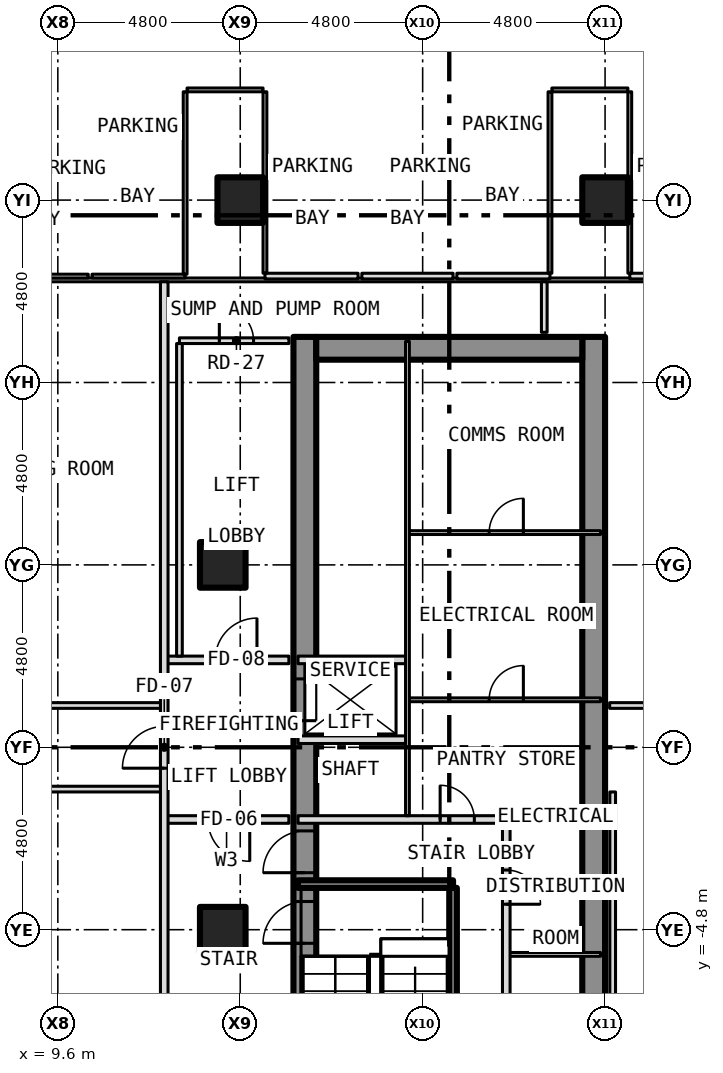
"""IFC4 building model, lengths in metres.
Left out: names, types, materials, properties, quantities, classifications, styles, units other than length and angle.
Written with IfcOpenShell. Run it as: python <this file> out.ifc"""

import sys

from ifc_helpers import new_model, si_unit, direction, frame, frame_2d, origin, origin_2d, place, context, subcontext, project, spatial, rectangle, hollow_rectangle, extrude, element, fill, save


model = new_model("IFC4")
c1 = context("Model", 3, precision=1e-05, world=origin(), true_north=direction((0.0, 1.0)))
c2 = subcontext(c1, "Body", "Model", "MODEL_VIEW")
j1 = project(units=[si_unit("LENGTHUNIT", "METRE"), si_unit("PLANEANGLEUNIT", "RADIAN")], contexts=[c1])
p1 = place(None, origin())
s1 = spatial("IfcSite", under=j1, at=p1, CompositionType="ELEMENT")
p2 = place(p1, origin())
s2 = spatial("IfcBuilding", under=s1, at=p2, CompositionType="ELEMENT")
p3 = place(p2, frame((0.0, 0.0, -10.0)))
s3 = spatial("IfcBuildingStorey", under=s2, at=p3, CompositionType="ELEMENT", Elevation=-10.0)
for number, where, z_axis, x_axis in (
    (1, (13.94, -4.8, -0.6), (0.0, 0.0, 1.0), (1.0, 0.0, 0.0)),
    (2, (13.94, 4.8, -0.6), (0.0, 0.0, 1.0), (1.0, 0.0, 0.0)),
    (3, (14.4, 14.4, -0.6), (0.0, 0.0, 1.0), (1.0, 0.0, 0.0)),
    (4, (24.0, 14.4, -0.6), (0.0, 0.0, 1.0), (1.0, 0.0, 0.0)),
):
    element("IfcColumn", number, at=place(p3, frame(where, z_axis=z_axis, x_axis=x_axis)), inside=s3, PredefinedType="COLUMN", context=c2, shape_type="SweptSolid", body=[
        extrude(hollow_rectangle(XDim=1.2, YDim=1.2, WallThickness=0.07, at=origin_2d()), origin(), (0.0, 0.0, 1.0), 5.3),
    ])
p4 = place(p3, frame((16.1, -10.8, 0.0), z_axis=(0.0, 0.0, 1.0), x_axis=(0.0, 1.0, 0.0)))
e5 = element("IfcWall", 5, at=p4, inside=s3, PredefinedType="SHEAR", context=c2, shape_type="SweptSolid", body=[
    extrude(rectangle(XDim=21.6, YDim=0.6, at=frame_2d((10.8, 0.0))), origin(), (0.0, 0.0, 1.0), 4.7),
])
p5 = place(p4, frame((11.5, 0.0, 0.0)))
e6 = element("IfcOpeningElement", 6, at=p5, cuts=e5, PredefinedType="OPENING", context=c2, shape_type="SweptSolid", body=[
    extrude(rectangle(XDim=1.1, YDim=2.1, at=frame_2d((0.55, 1.05))), frame((0.0, 0.312, 0.0), z_axis=(0.0, -1.0, 0.0), x_axis=(1.0, 0.0, 0.0)), (0.0, 0.0, 1.0), 0.624),
])
p6 = place(p4, frame((5.642, 0.0, 0.0)))
e7 = element("IfcOpeningElement", 7, at=p6, cuts=e5, PredefinedType="OPENING", context=c2, shape_type="SweptSolid", body=[
    extrude(rectangle(XDim=1.1, YDim=2.1, at=frame_2d((0.55, 1.05))), frame((0.0, 0.312, 0.0), z_axis=(0.0, -1.0, 0.0), x_axis=(1.0, 0.0, 0.0)), (0.0, 0.0, 1.0), 0.624),
])
p7 = place(p4, frame((7.5, 0.0, 0.0)))
e8 = element("IfcOpeningElement", 8, at=p7, cuts=e5, PredefinedType="OPENING", context=c2, shape_type="SweptSolid", body=[
    extrude(rectangle(XDim=1.1, YDim=2.1, at=frame_2d((0.55, 1.05))), frame((0.0, 0.312, 0.0), z_axis=(0.0, -1.0, 0.0), x_axis=(1.0, 0.0, 0.0)), (0.0, 0.0, 1.0), 0.624),
])
p8 = place(p3, frame((23.7, -10.8, 0.0), z_axis=(0.0, 0.0, 1.0), x_axis=(0.0, 1.0, 0.0)))
e9 = element("IfcWall", 9, at=p8, inside=s3, PredefinedType="SHEAR", context=c2, shape_type="SweptSolid", body=[
    extrude(rectangle(XDim=21.6, YDim=0.6, at=frame_2d((10.8, 0.0))), origin(), (0.0, 0.0, 1.0), 4.7),
])
p9 = place(p3, frame((16.4, 10.5, 0.0), z_axis=(0.0, 0.0, 1.0), x_axis=(1.0, 0.0, 0.0)))
e10 = element("IfcWall", 10, at=p9, inside=s3, PredefinedType="SHEAR", context=c2, shape_type="SweptSolid", body=[
    extrude(rectangle(XDim=7.0, YDim=0.6, at=frame_2d((3.5, 0.0))), origin(), (0.0, 0.0, 1.0), 4.7),
])
p10 = place(p3, frame((21.4, -5.45, 0.0), z_axis=(0.0, 0.0, 1.0), x_axis=(1.0, 0.0, 0.0)))
e11 = element("IfcWall", 11, at=p10, inside=s3, PredefinedType="PARTITIONING", context=c2, shape_type="SweptSolid", body=[
    extrude(rectangle(XDim=2.48, YDim=0.1, at=frame_2d((1.24, 0.0))), origin(), (0.0, 0.0, 1.0), 4.7),
])
p11 = place(p3, frame((15.92, -3.6, 0.0), z_axis=(0.0, 0.0, 1.0), x_axis=(1.0, 0.0, 0.0)))
e12 = element("IfcWall", 12, at=p11, inside=s3, PredefinedType="SHEAR", context=c2, shape_type="SweptSolid", body=[
    extrude(rectangle(XDim=4.08, YDim=0.2, at=frame_2d((2.04, 0.0))), origin(), (0.0, 0.0, 1.0), 4.7),
])
p12 = place(p3, frame((12.4, -1.9, 0.0), z_axis=(0.0, 0.0, 1.0), x_axis=(1.0, 0.0, 0.0)))
e13 = element("IfcWall", 13, at=p12, inside=s3, PredefinedType="PARTITIONING", context=c2, shape_type="SweptSolid", body=[
    extrude(rectangle(XDim=3.28, YDim=0.2, at=frame_2d((1.64, 0.0))), origin(), (0.0, 0.0, 1.0), 4.7),
])
p13 = place(p12, frame((1.15, 0.0, 0.0)))
e14 = element("IfcOpeningElement", 14, at=p13, cuts=e13, PredefinedType="OPENING", context=c2, shape_type="SweptSolid", body=[
    extrude(rectangle(XDim=1.1, YDim=2.1, at=frame_2d((0.55, 1.05))), frame((0.0, 0.112, 0.0), z_axis=(0.0, -1.0, 0.0), x_axis=(1.0, 0.0, 0.0)), (0.0, 0.0, 1.0), 0.224),
])
p14 = place(p3, frame((15.92, -1.9, 0.0), z_axis=(0.0, 0.0, 1.0), x_axis=(1.0, 0.0, 0.0)))
e15 = element("IfcWall", 15, at=p14, inside=s3, PredefinedType="PARTITIONING", context=c2, shape_type="SweptSolid", body=[
    extrude(rectangle(XDim=7.96, YDim=0.2, at=frame_2d((3.98, 0.0))), origin(), (0.0, 0.0, 1.0), 4.7),
])
p15 = place(p14, frame((3.74, 0.0, 0.0)))
e16 = element("IfcOpeningElement", 16, at=p15, cuts=e15, PredefinedType="OPENING", context=c2, shape_type="SweptSolid", body=[
    extrude(rectangle(XDim=0.9, YDim=2.1, at=frame_2d((0.45, 1.05))), frame((0.0, 0.112, 0.0), z_axis=(0.0, -1.0, 0.0), x_axis=(1.0, 0.0, 0.0)), (0.0, 0.0, 1.0), 0.224),
])
p16 = place(p3, frame((-12.4, -1.1, 0.0), z_axis=(0.0, 0.0, 1.0), x_axis=(1.0, 0.0, 0.0)))
e17 = element("IfcWall", 17, at=p16, inside=s3, PredefinedType="PARTITIONING", context=c2, shape_type="SweptSolid", body=[
    extrude(rectangle(XDim=24.8, YDim=0.15, at=frame_2d((12.4, 0.0))), origin(), (0.0, 0.0, 1.0), 4.7),
])
p17 = place(p3, frame((15.92, 0.2, 0.0), z_axis=(0.0, 0.0, 1.0), x_axis=(1.0, 0.0, 0.0)))
e18 = element("IfcWall", 18, at=p17, inside=s3, PredefinedType="PARTITIONING", context=c2, shape_type="SweptSolid", body=[
    extrude(rectangle(XDim=2.88, YDim=0.2, at=frame_2d((1.44, 0.0))), origin(), (0.0, 0.0, 1.0), 4.7),
])
p18 = place(p3, frame((-12.4, 1.1, 0.0), z_axis=(0.0, 0.0, 1.0), x_axis=(1.0, 0.0, 0.0)))
e19 = element("IfcWall", 19, at=p18, inside=s3, PredefinedType="PARTITIONING", context=c2, shape_type="SweptSolid", body=[
    extrude(rectangle(XDim=24.8, YDim=0.15, at=frame_2d((12.4, 0.0))), origin(), (0.0, 0.0, 1.0), 4.7),
])
p19 = place(p18, frame((9.35, 0.0, 0.0)))
e20 = element("IfcOpeningElement", 20, at=p19, cuts=e19, PredefinedType="OPENING", context=c2, shape_type="SweptSolid", body=[
    extrude(rectangle(XDim=0.9, YDim=2.1, at=frame_2d((0.45, 1.05))), frame((0.0, 0.087, 0.0), z_axis=(0.0, -1.0, 0.0), x_axis=(1.0, 0.0, 0.0)), (0.0, 0.0, 1.0), 0.174),
])
p20 = place(p18, frame((19.35, 0.0, 0.0)))
e21 = element("IfcOpeningElement", 21, at=p20, cuts=e19, PredefinedType="OPENING", context=c2, shape_type="SweptSolid", body=[
    extrude(rectangle(XDim=0.9, YDim=2.1, at=frame_2d((0.45, 1.05))), frame((0.0, 0.087, 0.0), z_axis=(0.0, -1.0, 0.0), x_axis=(1.0, 0.0, 0.0)), (0.0, 0.0, 1.0), 0.174),
])
p21 = place(p3, frame((24.12, 1.1, 0.0), z_axis=(0.0, 0.0, 1.0), x_axis=(1.0, 0.0, 0.0)))
e22 = element("IfcWall", 22, at=p21, inside=s3, PredefinedType="PARTITIONING", context=c2, shape_type="SweptSolid", body=[
    extrude(rectangle(XDim=8.23, YDim=0.15, at=frame_2d((4.115, 0.0))), origin(), (0.0, 0.0, 1.0), 4.7),
])
p22 = place(p21, frame((3.63, 0.0, 0.0)))
e23 = element("IfcOpeningElement", 23, at=p22, cuts=e22, PredefinedType="OPENING", context=c2, shape_type="SweptSolid", body=[
    extrude(rectangle(XDim=0.9, YDim=2.1, at=frame_2d((0.45, 1.05))), frame((0.0, 0.087, 0.0), z_axis=(0.0, -1.0, 0.0), x_axis=(1.0, 0.0, 0.0)), (0.0, 0.0, 1.0), 0.174),
])
p23 = place(p3, frame((18.8, 1.25, 0.0), z_axis=(0.0, 0.0, 1.0), x_axis=(1.0, 0.0, 0.0)))
e24 = element("IfcWall", 24, at=p23, inside=s3, PredefinedType="PARTITIONING", context=c2, shape_type="SweptSolid", body=[
    extrude(rectangle(XDim=5.08, YDim=0.1, at=frame_2d((2.54, 0.0))), origin(), (0.0, 0.0, 1.0), 4.7),
])
p24 = place(p23, frame((2.15, 0.0, 0.0)))
e25 = element("IfcOpeningElement", 25, at=p24, cuts=e24, PredefinedType="OPENING", context=c2, shape_type="SweptSolid", body=[
    extrude(rectangle(XDim=0.9, YDim=2.1, at=frame_2d((0.45, 1.05))), frame((0.0, 0.062, 0.0), z_axis=(0.0, -1.0, 0.0), x_axis=(1.0, 0.0, 0.0)), (0.0, 0.0, 1.0), 0.124),
])
p25 = place(p3, frame((12.4, 2.3, 0.0), z_axis=(0.0, 0.0, 1.0), x_axis=(1.0, 0.0, 0.0)))
e26 = element("IfcWall", 26, at=p25, inside=s3, PredefinedType="PARTITIONING", context=c2, shape_type="SweptSolid", body=[
    extrude(rectangle(XDim=3.28, YDim=0.2, at=frame_2d((1.64, 0.0))), origin(), (0.0, 0.0, 1.0), 4.7),
])
p26 = place(p25, frame((1.34, 0.0, 0.0)))
e27 = element("IfcOpeningElement", 27, at=p26, cuts=e26, PredefinedType="OPENING", context=c2, shape_type="SweptSolid", body=[
    extrude(rectangle(XDim=1.1, YDim=2.1, at=frame_2d((0.55, 1.05))), frame((0.0, 0.112, 0.0), z_axis=(0.0, -1.0, 0.0), x_axis=(1.0, 0.0, 0.0)), (0.0, 0.0, 1.0), 0.224),
])
p27 = place(p3, frame((15.92, 2.3, 0.0), z_axis=(0.0, 0.0, 1.0), x_axis=(1.0, 0.0, 0.0)))
e28 = element("IfcWall", 28, at=p27, inside=s3, PredefinedType="PARTITIONING", context=c2, shape_type="SweptSolid", body=[
    extrude(rectangle(XDim=2.88, YDim=0.2, at=frame_2d((1.44, 0.0))), origin(), (0.0, 0.0, 1.0), 4.7),
])
p28 = place(p3, frame((18.8, 5.65, 0.0), z_axis=(0.0, 0.0, 1.0), x_axis=(1.0, 0.0, 0.0)))
e29 = element("IfcWall", 29, at=p28, inside=s3, PredefinedType="PARTITIONING", context=c2, shape_type="SweptSolid", body=[
    extrude(rectangle(XDim=5.08, YDim=0.1, at=frame_2d((2.54, 0.0))), origin(), (0.0, 0.0, 1.0), 4.7),
])
p29 = place(p28, frame((2.15, 0.0, 0.0)))
e30 = element("IfcOpeningElement", 30, at=p29, cuts=e29, PredefinedType="OPENING", context=c2, shape_type="SweptSolid", body=[
    extrude(rectangle(XDim=0.9, YDim=2.1, at=frame_2d((0.45, 1.05))), frame((0.0, 0.062, 0.0), z_axis=(0.0, -1.0, 0.0), x_axis=(1.0, 0.0, 0.0)), (0.0, 0.0, 1.0), 0.124),
])
p30 = place(p3, frame((12.8, 10.7, 0.0), z_axis=(0.0, 0.0, 1.0), x_axis=(1.0, 0.0, 0.0)))
e31 = element("IfcWall", 31, at=p30, inside=s3, PredefinedType="PARTITIONING", context=c2, shape_type="SweptSolid", body=[
    extrude(rectangle(XDim=2.88, YDim=0.15, at=frame_2d((1.44, 0.0))), origin(), (0.0, 0.0, 1.0), 4.7),
])
p31 = place(p30, frame((1.05, 0.0, 0.0)))
e32 = element("IfcOpeningElement", 32, at=p31, cuts=e31, PredefinedType="OPENING", context=c2, shape_type="SweptSolid", body=[
    extrude(rectangle(XDim=0.9, YDim=2.1, at=frame_2d((0.45, 1.05))), frame((0.0, 0.087, 0.0), z_axis=(0.0, -1.0, 0.0), x_axis=(1.0, 0.0, 0.0)), (0.0, 0.0, 1.0), 0.174),
])
p32 = place(p3, frame((-37.6, 12.3, 0.0), z_axis=(0.0, 0.0, 1.0), x_axis=(1.0, 0.0, 0.0)))
e33 = element("IfcWall", 33, at=p32, inside=s3, PredefinedType="PARTITIONING", context=c2, shape_type="SweptSolid", body=[
    extrude(rectangle(XDim=70.0, YDim=0.1, at=frame_2d((35.0, 0.0))), origin(), (0.0, 0.0, 1.0), 4.7),
])
p33 = place(p3, frame((8.0, 12.4, 0.0), z_axis=(0.0, 0.0, 1.0), x_axis=(1.0, 0.0, 0.0)))
e34 = element("IfcWall", 34, at=p33, inside=s3, PredefinedType="PARTITIONING", context=c2, shape_type="SweptSolid", body=[
    extrude(rectangle(XDim=2.4, YDim=0.1, at=frame_2d((1.2, 0.0))), origin(), (0.0, 0.0, 1.0), 4.7),
])
p34 = place(p3, frame((10.5, 12.4, 0.0), z_axis=(0.0, 0.0, 1.0), x_axis=(1.0, 0.0, 0.0)))
e35 = element("IfcWall", 35, at=p34, inside=s3, PredefinedType="PARTITIONING", context=c2, shape_type="SweptSolid", body=[
    extrude(rectangle(XDim=2.45, YDim=0.1, at=frame_2d((1.225, 0.0))), origin(), (0.0, 0.0, 1.0), 4.7),
])
p35 = place(p3, frame((15.05, 12.4, 0.0), z_axis=(0.0, 0.0, 1.0), x_axis=(1.0, 0.0, 0.0)))
e36 = element("IfcWall", 36, at=p35, inside=s3, PredefinedType="PARTITIONING", context=c2, shape_type="SweptSolid", body=[
    extrude(rectangle(XDim=2.45, YDim=0.15, at=frame_2d((1.225, 0.0))), origin(), (0.0, 0.0, 1.0), 4.7),
])
p36 = place(p3, frame((17.6, 12.4, 0.0), z_axis=(0.0, 0.0, 1.0), x_axis=(1.0, 0.0, 0.0)))
e37 = element("IfcWall", 37, at=p36, inside=s3, PredefinedType="PARTITIONING", context=c2, shape_type="SweptSolid", body=[
    extrude(rectangle(XDim=2.4, YDim=0.15, at=frame_2d((1.2, 0.0))), origin(), (0.0, 0.0, 1.0), 4.7),
])
p37 = place(p3, frame((20.1, 12.4, 0.0), z_axis=(0.0, 0.0, 1.0), x_axis=(1.0, 0.0, 0.0)))
e38 = element("IfcWall", 38, at=p37, inside=s3, PredefinedType="PARTITIONING", context=c2, shape_type="SweptSolid", body=[
    extrude(rectangle(XDim=2.45, YDim=0.15, at=frame_2d((1.225, 0.0))), origin(), (0.0, 0.0, 1.0), 4.7),
])
p38 = place(p3, frame((24.65, 12.4, 0.0), z_axis=(0.0, 0.0, 1.0), x_axis=(1.0, 0.0, 0.0)))
e39 = element("IfcWall", 39, at=p38, inside=s3, PredefinedType="PARTITIONING", context=c2, shape_type="SweptSolid", body=[
    extrude(rectangle(XDim=2.45, YDim=0.15, at=frame_2d((1.225, 0.0))), origin(), (0.0, 0.0, 1.0), 4.7),
])
for number, where, z_axis, x_axis in (
    (40, (13.0, 17.3, 0.0), (0.0, 0.0, 1.0), (1.0, 0.0, 0.0)),
    (41, (22.6, 17.3, 0.0), (0.0, 0.0, 1.0), (1.0, 0.0, 0.0)),
):
    element("IfcWall", number, at=place(p3, frame(where, z_axis=z_axis, x_axis=x_axis)), inside=s3, PredefinedType="PARTITIONING", context=c2, shape_type="SweptSolid", body=[
        extrude(rectangle(XDim=2.0, YDim=0.1, at=frame_2d((1.0, 0.0))), origin(), (0.0, 0.0, 1.0), 4.7),
    ])
p39 = place(p3, frame((12.4, -10.725, 0.0), z_axis=(0.0, 0.0, 1.0), x_axis=(0.0, 1.0, 0.0)))
e42 = element("IfcWall", 42, at=p39, inside=s3, PredefinedType="PARTITIONING", context=c2, shape_type="SweptSolid", body=[
    extrude(rectangle(XDim=22.975, YDim=0.2, at=frame_2d((11.488, 0.0))), origin(), (0.0, 0.0, 1.0), 4.7),
])
p40 = place(p39, frame((10.175, 0.0, 0.0)))
e43 = element("IfcOpeningElement", 43, at=p40, cuts=e42, PredefinedType="OPENING", context=c2, shape_type="SweptSolid", body=[
    extrude(rectangle(XDim=1.1, YDim=2.1, at=frame_2d((0.55, 1.05))), frame((0.0, 0.112, 0.0), z_axis=(0.0, -1.0, 0.0), x_axis=(1.0, 0.0, 0.0)), (0.0, 0.0, 1.0), 0.224),
])
p41 = place(p3, frame((12.8, 2.4, 0.0), z_axis=(0.0, 0.0, 1.0), x_axis=(0.0, 1.0, 0.0)))
e44 = element("IfcWall", 44, at=p41, inside=s3, PredefinedType="PARTITIONING", context=c2, shape_type="SweptSolid", body=[
    extrude(rectangle(XDim=8.225, YDim=0.15, at=frame_2d((4.113, 0.0))), origin(), (0.0, 0.0, 1.0), 4.7),
])
p42 = place(p3, frame((12.95, 12.45, 0.0), z_axis=(0.0, 0.0, 1.0), x_axis=(0.0, 1.0, 0.0)))
e45 = element("IfcWall", 45, at=p42, inside=s3, PredefinedType="PARTITIONING", context=c2, shape_type="SweptSolid", body=[
    extrude(rectangle(XDim=4.8, YDim=0.1, at=frame_2d((2.4, 0.0))), origin(), (0.0, 0.0, 1.0), 4.7),
])
p43 = place(p3, frame((15.05, 12.475, 0.0), z_axis=(0.0, 0.0, 1.0), x_axis=(0.0, 1.0, 0.0)))
e46 = element("IfcWall", 46, at=p43, inside=s3, PredefinedType="PARTITIONING", context=c2, shape_type="SweptSolid", body=[
    extrude(rectangle(XDim=4.775, YDim=0.1, at=frame_2d((2.387, 0.0))), origin(), (0.0, 0.0, 1.0), 4.7),
])
p44 = place(p3, frame((18.8, -1.8, 0.0), z_axis=(0.0, 0.0, 1.0), x_axis=(0.0, 1.0, 0.0)))
e47 = element("IfcWall", 47, at=p44, inside=s3, PredefinedType="PARTITIONING", context=c2, shape_type="SweptSolid", body=[
    extrude(rectangle(XDim=12.48, YDim=0.1, at=frame_2d((6.24, 0.0))), origin(), (0.0, 0.0, 1.0), 4.7),
])
p45 = place(p3, frame((20.0, -10.68, 0.0), z_axis=(0.0, 0.0, 1.0), x_axis=(0.0, 1.0, 0.0)))
e48 = element("IfcWall", 48, at=p45, inside=s3, PredefinedType="SHEAR", context=c2, shape_type="SweptSolid", body=[
    extrude(rectangle(XDim=6.98, YDim=0.2, at=frame_2d((3.49, 0.0))), origin(), (0.0, 0.0, 1.0), 4.7),
])
p46 = place(p3, frame((21.4, -10.68, 0.0), z_axis=(0.0, 0.0, 1.0), x_axis=(0.0, 1.0, 0.0)))
e49 = element("IfcWall", 49, at=p46, inside=s3, PredefinedType="PARTITIONING", context=c2, shape_type="SweptSolid", body=[
    extrude(rectangle(XDim=8.68, YDim=0.2, at=frame_2d((4.34, 0.0))), origin(), (0.0, 0.0, 1.0), 4.7),
])
p47 = place(p46, frame((2.1, 0.0, 0.0)))
e50 = element("IfcOpeningElement", 50, at=p47, cuts=e49, PredefinedType="OPENING", context=c2, shape_type="SweptSolid", body=[
    extrude(rectangle(XDim=0.9, YDim=2.1, at=frame_2d((0.45, 1.05))), frame((0.0, 0.112, 0.0), z_axis=(0.0, -1.0, 0.0), x_axis=(1.0, 0.0, 0.0)), (0.0, 0.0, 1.0), 0.224),
])
p48 = place(p46, frame((6.55, 0.0, 0.0)))
e51 = element("IfcOpeningElement", 51, at=p48, cuts=e49, PredefinedType="OPENING", context=c2, shape_type="SweptSolid", body=[
    extrude(rectangle(XDim=0.9, YDim=2.1, at=frame_2d((0.45, 1.05))), frame((0.0, 0.112, 0.0), z_axis=(0.0, -1.0, 0.0), x_axis=(1.0, 0.0, 0.0)), (0.0, 0.0, 1.0), 0.224),
])
p49 = place(p3, frame((22.4, 10.92, 0.0), z_axis=(0.0, 0.0, 1.0), x_axis=(0.0, 1.0, 0.0)))
e52 = element("IfcWall", 52, at=p49, inside=s3, PredefinedType="PARTITIONING", context=c2, shape_type="SweptSolid", body=[
    extrude(rectangle(XDim=1.33, YDim=0.15, at=frame_2d((0.665, 0.0))), origin(), (0.0, 0.0, 1.0), 4.7),
])
p50 = place(p3, frame((22.55, 12.475, 0.0), z_axis=(0.0, 0.0, 1.0), x_axis=(0.0, 1.0, 0.0)))
e53 = element("IfcWall", 53, at=p50, inside=s3, PredefinedType="PARTITIONING", context=c2, shape_type="SweptSolid", body=[
    extrude(rectangle(XDim=4.775, YDim=0.1, at=frame_2d((2.387, 0.0))), origin(), (0.0, 0.0, 1.0), 4.7),
])
p51 = place(p3, frame((24.2, -10.725, 0.0), z_axis=(0.0, 0.0, 1.0), x_axis=(0.0, 1.0, 0.0)))
e54 = element("IfcWall", 54, at=p51, inside=s3, PredefinedType="PARTITIONING", context=c2, shape_type="SweptSolid", body=[
    extrude(rectangle(XDim=9.55, YDim=0.15, at=frame_2d((4.775, 0.0))), origin(), (0.0, 0.0, 1.0), 4.7),
])
p52 = place(p3, frame((24.65, 12.475, 0.0), z_axis=(0.0, 0.0, 1.0), x_axis=(0.0, 1.0, 0.0)))
e55 = element("IfcWall", 55, at=p52, inside=s3, PredefinedType="PARTITIONING", context=c2, shape_type="SweptSolid", body=[
    extrude(rectangle(XDim=4.775, YDim=0.1, at=frame_2d((2.387, 0.0))), origin(), (0.0, 0.0, 1.0), 4.7),
])
p53 = place(p5, origin())
e56 = element("IfcDoor", 56, at=p53, inside=s3, OperationType="SLIDING_TO_LEFT", PredefinedType="DOOR", context=c2, shape_type="SweptSolid", body=[
    extrude(rectangle(XDim=1.1, YDim=2.1, at=frame_2d((0.55, 1.05))), frame((0.0, 0.025, 0.0), z_axis=(0.0, -1.0, 0.0), x_axis=(1.0, 0.0, 0.0)), (0.0, 0.0, 1.0), 0.05),
])
fill(e6, e56)
p54 = place(p6, origin())
e57 = element("IfcDoor", 57, at=p54, inside=s3, OperationType="SINGLE_SWING_LEFT", PredefinedType="DOOR", context=c2, shape_type="SweptSolid", body=[
    extrude(rectangle(XDim=1.1, YDim=2.1, at=frame_2d((0.55, 1.05))), frame((0.0, 0.025, 0.0), z_axis=(0.0, -1.0, 0.0), x_axis=(1.0, 0.0, 0.0)), (0.0, 0.0, 1.0), 0.05),
])
fill(e7, e57)
p55 = place(p7, origin())
e58 = element("IfcDoor", 58, at=p55, inside=s3, OperationType="SINGLE_SWING_LEFT", PredefinedType="DOOR", context=c2, shape_type="SweptSolid", body=[
    extrude(rectangle(XDim=1.1, YDim=2.1, at=frame_2d((0.55, 1.05))), frame((0.0, 0.025, 0.0), z_axis=(0.0, -1.0, 0.0), x_axis=(1.0, 0.0, 0.0)), (0.0, 0.0, 1.0), 0.05),
])
fill(e8, e58)
p56 = place(p48, origin())
e59 = element("IfcDoor", 59, at=p56, inside=s3, OperationType="SINGLE_SWING_LEFT", PredefinedType="DOOR", context=c2, shape_type="SweptSolid", body=[
    extrude(rectangle(XDim=0.9, YDim=2.1, at=frame_2d((0.45, 1.05))), frame((0.0, 0.025, 0.0), z_axis=(0.0, -1.0, 0.0), x_axis=(1.0, 0.0, 0.0)), (0.0, 0.0, 1.0), 0.05),
])
fill(e51, e59)
p57 = place(p15, origin())
e60 = element("IfcDoor", 60, at=p57, inside=s3, OperationType="SINGLE_SWING_LEFT", PredefinedType="DOOR", context=c2, shape_type="SweptSolid", body=[
    extrude(rectangle(XDim=0.9, YDim=2.1, at=frame_2d((0.45, 1.05))), frame((0.0, 0.025, 0.0), z_axis=(0.0, -1.0, 0.0), x_axis=(1.0, 0.0, 0.0)), (0.0, 0.0, 1.0), 0.05),
])
fill(e16, e60)
p58 = place(p24, origin())
e61 = element("IfcDoor", 61, at=p58, inside=s3, OperationType="SINGLE_SWING_RIGHT", PredefinedType="DOOR", context=c2, shape_type="SweptSolid", body=[
    extrude(rectangle(XDim=0.9, YDim=2.1, at=frame_2d((0.45, 1.05))), frame((0.0, 0.025, 0.0), z_axis=(0.0, -1.0, 0.0), x_axis=(1.0, 0.0, 0.0)), (0.0, 0.0, 1.0), 0.05),
])
fill(e25, e61)
p59 = place(p29, origin())
e62 = element("IfcDoor", 62, at=p59, inside=s3, OperationType="SINGLE_SWING_RIGHT", PredefinedType="DOOR", context=c2, shape_type="SweptSolid", body=[
    extrude(rectangle(XDim=0.9, YDim=2.1, at=frame_2d((0.45, 1.05))), frame((0.0, 0.025, 0.0), z_axis=(0.0, -1.0, 0.0), x_axis=(1.0, 0.0, 0.0)), (0.0, 0.0, 1.0), 0.05),
])
fill(e30, e62)
p60 = place(p13, origin())
e63 = element("IfcDoor", 63, at=p60, inside=s3, OperationType="SINGLE_SWING_RIGHT", PredefinedType="DOOR", context=c2, shape_type="SweptSolid", body=[
    extrude(rectangle(XDim=1.1, YDim=2.1, at=frame_2d((0.55, 1.05))), frame((0.0, 0.025, 0.0), z_axis=(0.0, -1.0, 0.0), x_axis=(1.0, 0.0, 0.0)), (0.0, 0.0, 1.0), 0.05),
])
fill(e14, e63)
p61 = place(p40, origin())
e64 = element("IfcDoor", 64, at=p61, inside=s3, OperationType="SINGLE_SWING_LEFT", PredefinedType="DOOR", context=c2, shape_type="SweptSolid", body=[
    extrude(rectangle(XDim=1.1, YDim=2.1, at=frame_2d((0.55, 1.05))), frame((0.0, 0.025, 0.0), z_axis=(0.0, -1.0, 0.0), x_axis=(1.0, 0.0, 0.0)), (0.0, 0.0, 1.0), 0.05),
])
fill(e43, e64)
p62 = place(p26, origin())
e65 = element("IfcDoor", 65, at=p62, inside=s3, OperationType="SINGLE_SWING_RIGHT", PredefinedType="DOOR", context=c2, shape_type="SweptSolid", body=[
    extrude(rectangle(XDim=1.1, YDim=2.1, at=frame_2d((0.55, 1.05))), frame((0.0, 0.025, 0.0), z_axis=(0.0, -1.0, 0.0), x_axis=(1.0, 0.0, 0.0)), (0.0, 0.0, 1.0), 0.05),
])
fill(e27, e65)
p63 = place(p31, origin())
e66 = element("IfcDoor", 66, at=p63, inside=s3, OperationType="SINGLE_SWING_LEFT", PredefinedType="DOOR", context=c2, shape_type="SweptSolid", body=[
    extrude(rectangle(XDim=0.9, YDim=2.1, at=frame_2d((0.45, 1.05))), frame((0.0, 0.025, 0.0), z_axis=(0.0, -1.0, 0.0), x_axis=(1.0, 0.0, 0.0)), (0.0, 0.0, 1.0), 0.05),
])
fill(e32, e66)
save(model, sys.argv[1])
